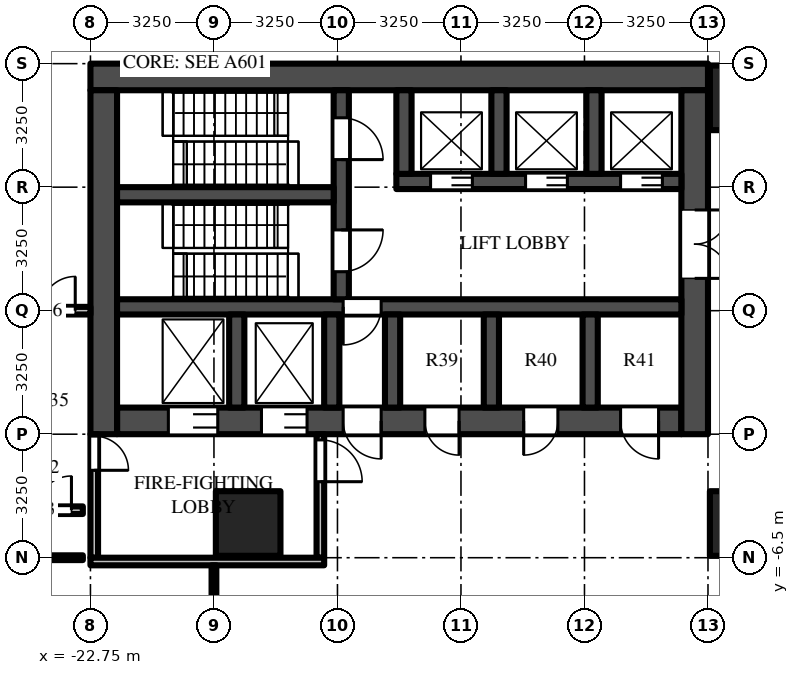
"""IFC4 building model, lengths in metres.
Left out: names, types, materials, properties, quantities, classifications, styles, units other than length and angle.
Written with IfcOpenShell. Run it as: python <this file> out.ifc"""

import sys

from ifc_helpers import new_model, si_unit, direction, frame, frame_2d, origin, origin_2d, place, context, subcontext, project, spatial, rectangle, extrude, source, transform, mapped, element, fill, save


model = new_model("IFC4")
c1 = context("Model", 3, precision=1e-05, world=origin(), true_north=direction((0.0, 1.0)))
c2 = subcontext(c1, "Body", "Model", "MODEL_VIEW")
j1 = project(units=[si_unit("LENGTHUNIT", "METRE"), si_unit("PLANEANGLEUNIT", "RADIAN")], contexts=[c1])
p1 = place(None, origin())
s1 = spatial("IfcSite", under=j1, at=p1, CompositionType="ELEMENT")
p2 = place(p1, origin())
s2 = spatial("IfcBuilding", under=s1, at=p2, CompositionType="ELEMENT")
p3 = place(p2, origin())
s3 = spatial("IfcBuildingStorey", under=s2, at=p3, CompositionType="ELEMENT", Elevation=0.0)
m1 = source(origin(), c2, "Body", "SweptSolid", [
    extrude(rectangle(XDim=1.7, YDim=1.7, at=origin_2d()), origin(), (0.0, 0.0, 1.0), 8.5),
])
for number, where, z_axis, x_axis in (
    (1, (-5.6, 5.6, -0.5), (0.0, 0.0, 1.0), (1.0, 0.0, 0.0)),
    (2, (-5.6, -5.6, -0.5), (0.0, 0.0, 1.0), (1.0, 0.0, 0.0)),
    (3, (-18.6, -5.6, -0.5), (0.0, 0.0, 1.0), (1.0, 0.0, 0.0)),
):
    element("IfcColumn", number, at=place(p3, frame(where, z_axis=z_axis, x_axis=x_axis)), inside=s3, PredefinedType="COLUMN", context=c2, shape_type="MappedRepresentation", body=[
        mapped(m1, transform((0.0, 0.0, 0.0))),
    ])
m2 = source(origin(), c2, "Body", "SweptSolid", [
    extrude(rectangle(XDim=16.25, YDim=0.7, at=frame_2d((8.125, 0.0))), origin(), (0.0, 0.0, 1.0), 7.7),
])
p4 = place(p3, frame((-6.5, 6.15, 0.0), z_axis=(0.0, 0.0, 1.0), x_axis=(-1.0, 0.0, 0.0)))
e4 = element("IfcWall", 4, at=p4, inside=s3, PredefinedType="SHEAR", context=c2, shape_type="MappedRepresentation", body=[
    mapped(m2, transform((0.0, 0.0, 0.0))),
])
m3 = source(origin(), c2, "Body", "SweptSolid", [
    extrude(rectangle(XDim=14.85, YDim=0.7, at=frame_2d((7.425, 0.0))), origin(), (0.0, 0.0, 1.0), 7.7),
])
p5 = place(p3, frame((-7.2, -2.9, 0.0), z_axis=(0.0, 0.0, 1.0), x_axis=(-1.0, 0.0, 0.0)))
e5 = element("IfcWall", 5, at=p5, inside=s3, PredefinedType="SHEAR", context=c2, shape_type="MappedRepresentation", body=[
    mapped(m3, transform((0.0, 0.0, 0.0))),
])
m4 = source(origin(), c2, "Body", "SweptSolid", [
    extrude(rectangle(XDim=1.3, YDim=2.1, at=frame_2d((0.65, 1.05))), frame((0.0, 0.36, 0.0), z_axis=(0.0, -1.0, 0.0), x_axis=(1.0, 0.0, 0.0)), (0.0, 0.0, 1.0), 0.72),
])
p6 = place(p5, frame((12.2, 0.0, 0.0)))
e6 = element("IfcOpeningElement", 6, at=p6, cuts=e5, PredefinedType="OPENING", context=c2, shape_type="MappedRepresentation", body=[
    mapped(m4, transform((0.0, 0.0, 0.0))),
])
m5 = source(origin(), c2, "Body", "SweptSolid", [
    extrude(rectangle(XDim=1.2, YDim=2.1, at=frame_2d((0.6, 1.05))), frame((0.0, 0.36, 0.0), z_axis=(0.0, -1.0, 0.0), x_axis=(1.0, 0.0, 0.0)), (0.0, 0.0, 1.0), 0.72),
])
p7 = place(p5, frame((9.85, 0.0, 0.0)))
e7 = element("IfcOpeningElement", 7, at=p7, cuts=e5, PredefinedType="OPENING", context=c2, shape_type="MappedRepresentation", body=[
    mapped(m5, transform((0.0, 0.0, 0.0))),
])
m6 = source(origin(), c2, "Body", "SweptSolid", [
    extrude(rectangle(XDim=1.0, YDim=2.1, at=frame_2d((0.5, 1.05))), frame((0.0, 0.36, 0.0), z_axis=(0.0, -1.0, 0.0), x_axis=(1.0, 0.0, 0.0)), (0.0, 0.0, 1.0), 0.72),
])
p8 = place(p5, frame((7.9, 0.0, 0.0)))
e8 = element("IfcOpeningElement", 8, at=p8, cuts=e5, PredefinedType="OPENING", context=c2, shape_type="MappedRepresentation", body=[
    mapped(m6, transform((0.0, 0.0, 0.0))),
])
p9 = place(p5, frame((0.6, 0.0, 0.0)))
e9 = element("IfcOpeningElement", 9, at=p9, cuts=e5, PredefinedType="OPENING", context=c2, shape_type="MappedRepresentation", body=[
    mapped(m6, transform((0.0, 0.0, 0.0))),
])
m7 = source(origin(), c2, "Body", "SweptSolid", [
    extrude(rectangle(XDim=0.9, YDim=2.1, at=frame_2d((0.45, 1.05))), frame((0.0, 0.36, 0.0), z_axis=(0.0, -1.0, 0.0), x_axis=(1.0, 0.0, 0.0)), (0.0, 0.0, 1.0), 0.72),
])
p10 = place(p5, frame((3.25, 0.0, 0.0)))
e10 = element("IfcOpeningElement", 10, at=p10, cuts=e5, PredefinedType="OPENING", context=c2, shape_type="MappedRepresentation", body=[
    mapped(m7, transform((0.0, 0.0, 0.0))),
])
p11 = place(p5, frame((5.85, 0.0, 0.0)))
e11 = element("IfcOpeningElement", 11, at=p11, cuts=e5, PredefinedType="OPENING", context=c2, shape_type="MappedRepresentation", body=[
    mapped(m7, transform((0.0, 0.0, 0.0))),
])
m8 = source(origin(), c2, "Body", "SweptSolid", [
    extrude(rectangle(XDim=9.05, YDim=0.7, at=frame_2d((4.525, 0.0))), origin(), (0.0, 0.0, 1.0), 7.7),
])
p12 = place(p3, frame((-6.85, 5.8, 0.0), z_axis=(0.0, 0.0, 1.0), x_axis=(0.0, -1.0, 0.0)))
e12 = element("IfcWall", 12, at=p12, inside=s3, PredefinedType="SHEAR", context=c2, shape_type="MappedRepresentation", body=[
    mapped(m8, transform((0.0, 0.0, 0.0))),
])
m9 = source(origin(), c2, "Body", "SweptSolid", [
    extrude(rectangle(XDim=1.8, YDim=2.1, at=frame_2d((0.9, 1.05))), frame((0.0, 0.36, 0.0), z_axis=(0.0, -1.0, 0.0), x_axis=(1.0, 0.0, 0.0)), (0.0, 0.0, 1.0), 0.72),
])
p13 = place(p12, frame((3.15, 0.0, 0.0)))
e13 = element("IfcOpeningElement", 13, at=p13, cuts=e12, PredefinedType="OPENING", context=c2, shape_type="MappedRepresentation", body=[
    mapped(m9, transform((0.0, 0.0, 0.0))),
])
p14 = place(p3, frame((-22.4, 5.8, 0.0), z_axis=(0.0, 0.0, 1.0), x_axis=(0.0, -1.0, 0.0)))
e14 = element("IfcWall", 14, at=p14, inside=s3, PredefinedType="SHEAR", context=c2, shape_type="MappedRepresentation", body=[
    mapped(m8, transform((0.0, 0.0, 0.0))),
])
m10 = source(origin(), c2, "Body", "SweptSolid", [
    extrude(rectangle(XDim=7.5, YDim=0.4, at=frame_2d((3.75, 0.0))), origin(), (0.0, 0.0, 1.0), 7.7),
])
p15 = place(p3, frame((-7.2, 3.4, 0.0), z_axis=(0.0, 0.0, 1.0), x_axis=(-1.0, 0.0, 0.0)))
e15 = element("IfcWall", 15, at=p15, inside=s3, PredefinedType="SHEAR", context=c2, shape_type="MappedRepresentation", body=[
    mapped(m10, transform((0.0, 0.0, 0.0))),
])
m11 = source(origin(), c2, "Body", "SweptSolid", [
    extrude(rectangle(XDim=1.1, YDim=2.1, at=frame_2d((0.55, 1.05))), frame((0.0, 0.21, 0.0), z_axis=(0.0, -1.0, 0.0), x_axis=(1.0, 0.0, 0.0)), (0.0, 0.0, 1.0), 0.42),
])
p16 = place(p15, frame((0.5, 0.0, 0.0)))
e16 = element("IfcOpeningElement", 16, at=p16, cuts=e15, PredefinedType="OPENING", context=c2, shape_type="MappedRepresentation", body=[
    mapped(m11, transform((0.0, 0.0, 0.0))),
])
p17 = place(p15, frame((3.0, 0.0, 0.0)))
e17 = element("IfcOpeningElement", 17, at=p17, cuts=e15, PredefinedType="OPENING", context=c2, shape_type="MappedRepresentation", body=[
    mapped(m11, transform((0.0, 0.0, 0.0))),
])
p18 = place(p15, frame((5.5, 0.0, 0.0)))
e18 = element("IfcOpeningElement", 18, at=p18, cuts=e15, PredefinedType="OPENING", context=c2, shape_type="MappedRepresentation", body=[
    mapped(m11, transform((0.0, 0.0, 0.0))),
])
m12 = source(origin(), c2, "Body", "SweptSolid", [
    extrude(rectangle(XDim=14.85, YDim=0.4, at=frame_2d((7.425, 0.0))), origin(), (0.0, 0.0, 1.0), 7.7),
])
p19 = place(p3, frame((-7.2, 0.1, 0.0), z_axis=(0.0, 0.0, 1.0), x_axis=(-1.0, 0.0, 0.0)))
e19 = element("IfcWall", 19, at=p19, inside=s3, PredefinedType="SHEAR", context=c2, shape_type="MappedRepresentation", body=[
    mapped(m12, transform((0.0, 0.0, 0.0))),
])
m13 = source(origin(), c2, "Body", "SweptSolid", [
    extrude(rectangle(XDim=1.0, YDim=2.1, at=frame_2d((0.5, 1.05))), frame((0.0, 0.21, 0.0), z_axis=(0.0, -1.0, 0.0), x_axis=(1.0, 0.0, 0.0)), (0.0, 0.0, 1.0), 0.42),
])
p20 = place(p19, frame((7.9, 0.0, 0.0)))
e20 = element("IfcOpeningElement", 20, at=p20, cuts=e19, PredefinedType="OPENING", context=c2, shape_type="MappedRepresentation", body=[
    mapped(m13, transform((0.0, 0.0, 0.0))),
])
m14 = source(origin(), c2, "Body", "SweptSolid", [
    extrude(rectangle(XDim=5.5, YDim=0.4, at=frame_2d((2.75, 0.0))), origin(), (0.0, 0.0, 1.0), 7.7),
])
p21 = place(p3, frame((-16.15, 5.8, 0.0), z_axis=(0.0, 0.0, 1.0), x_axis=(0.0, -1.0, 0.0)))
e21 = element("IfcWall", 21, at=p21, inside=s3, PredefinedType="SHEAR", context=c2, shape_type="MappedRepresentation", body=[
    mapped(m14, transform((0.0, 0.0, 0.0))),
])
p22 = place(p21, frame((0.725, 0.0, 0.0)))
e22 = element("IfcOpeningElement", 22, at=p22, cuts=e21, PredefinedType="OPENING", context=c2, shape_type="MappedRepresentation", body=[
    mapped(m11, transform((0.0, 0.0, 0.0))),
])
p23 = place(p21, frame((3.675, 0.0, 0.0)))
e23 = element("IfcOpeningElement", 23, at=p23, cuts=e21, PredefinedType="OPENING", context=c2, shape_type="MappedRepresentation", body=[
    mapped(m11, transform((0.0, 0.0, 0.0))),
])
m15 = source(origin(), c2, "Body", "SweptSolid", [
    extrude(rectangle(XDim=5.7, YDim=0.4, at=frame_2d((2.85, 0.0))), origin(), (0.0, 0.0, 1.0), 7.7),
])
p24 = place(p3, frame((-16.35, 3.05, 0.0), z_axis=(0.0, 0.0, 1.0), x_axis=(-1.0, 0.0, 0.0)))
e24 = element("IfcWall", 24, at=p24, inside=s3, PredefinedType="SHEAR", context=c2, shape_type="MappedRepresentation", body=[
    mapped(m15, transform((0.0, 0.0, 0.0))),
])
m16 = source(origin(), c2, "Body", "SweptSolid", [
    extrude(rectangle(XDim=2.2, YDim=0.4, at=frame_2d((1.1, 0.0))), origin(), (0.0, 0.0, 1.0), 7.7),
])
for number, where, z_axis, x_axis in (
    (25, (-9.5, 5.8, 0.0), (0.0, 0.0, 1.0), (0.0, -1.0, 0.0)),
    (26, (-12.0, 5.8, 0.0), (0.0, 0.0, 1.0), (0.0, -1.0, 0.0)),
    (27, (-14.5, 5.8, 0.0), (0.0, 0.0, 1.0), (0.0, -1.0, 0.0)),
):
    element("IfcWall", number, at=place(p3, frame(where, z_axis=z_axis, x_axis=x_axis)), inside=s3, PredefinedType="SHEAR", context=c2, shape_type="MappedRepresentation", body=[
        mapped(m16, transform((0.0, 0.0, 0.0))),
    ])
m17 = source(origin(), c2, "Body", "SweptSolid", [
    extrude(rectangle(XDim=2.45, YDim=0.4, at=frame_2d((1.225, 0.0))), origin(), (0.0, 0.0, 1.0), 7.7),
])
for number, where, z_axis, x_axis in (
    (28, (-9.6, -0.1, 0.0), (0.0, 0.0, 1.0), (0.0, -1.0, 0.0)),
    (29, (-12.2, -0.1, 0.0), (0.0, 0.0, 1.0), (0.0, -1.0, 0.0)),
    (30, (-14.8, -0.1, 0.0), (0.0, 0.0, 1.0), (0.0, -1.0, 0.0)),
    (31, (-16.4, -0.1, 0.0), (0.0, 0.0, 1.0), (0.0, -1.0, 0.0)),
    (32, (-18.9, -0.1, 0.0), (0.0, 0.0, 1.0), (0.0, -1.0, 0.0)),
):
    element("IfcWall", number, at=place(p3, frame(where, z_axis=z_axis, x_axis=x_axis)), inside=s3, PredefinedType="SHEAR", context=c2, shape_type="MappedRepresentation", body=[
        mapped(m17, transform((0.0, 0.0, 0.0))),
    ])
m18 = source(origin(), c2, "Body", "SweptSolid", [
    extrude(rectangle(XDim=3.25, YDim=0.2, at=frame_2d((1.625, 0.0))), origin(), (0.0, 0.0, 1.0), 7.7),
])
p25 = place(p3, frame((-16.7, -3.25, 0.0), z_axis=(0.0, 0.0, 1.0), x_axis=(0.0, -1.0, 0.0)))
e33 = element("IfcWall", 33, at=p25, inside=s3, PredefinedType="PARTITIONING", context=c2, shape_type="MappedRepresentation", body=[
    mapped(m18, transform((0.0, 0.0, 0.0))),
])
m19 = source(origin(), c2, "Body", "SweptSolid", [
    extrude(rectangle(XDim=1.1, YDim=2.1, at=frame_2d((0.55, 1.05))), frame((0.0, 0.11, 0.0), z_axis=(0.0, -1.0, 0.0), x_axis=(1.0, 0.0, 0.0)), (0.0, 0.0, 1.0), 0.22),
])
p26 = place(p25, frame((0.15, 0.0, 0.0)))
e34 = element("IfcOpeningElement", 34, at=p26, cuts=e33, PredefinedType="OPENING", context=c2, shape_type="MappedRepresentation", body=[
    mapped(m19, transform((0.0, 0.0, 0.0))),
])
p27 = place(p3, frame((-22.65, -3.25, 0.0), z_axis=(0.0, 0.0, 1.0), x_axis=(0.0, -1.0, 0.0)))
e35 = element("IfcWall", 35, at=p27, inside=s3, PredefinedType="PARTITIONING", context=c2, shape_type="MappedRepresentation", body=[
    mapped(m18, transform((0.0, 0.0, 0.0))),
])
m20 = source(origin(), c2, "Body", "SweptSolid", [
    extrude(rectangle(XDim=0.9, YDim=2.1, at=frame_2d((0.45, 1.05))), frame((0.0, 0.11, 0.0), z_axis=(0.0, -1.0, 0.0), x_axis=(1.0, 0.0, 0.0)), (0.0, 0.0, 1.0), 0.22),
])
p28 = place(p27, frame((0.05, 0.0, 0.0)))
e36 = element("IfcOpeningElement", 36, at=p28, cuts=e35, PredefinedType="OPENING", context=c2, shape_type="MappedRepresentation", body=[
    mapped(m20, transform((0.0, 0.0, 0.0))),
])
m21 = source(origin(), c2, "Body", "SweptSolid", [
    extrude(rectangle(XDim=6.15, YDim=0.2, at=frame_2d((3.075, 0.0))), origin(), (0.0, 0.0, 1.0), 7.7),
])
p29 = place(p3, frame((-16.6, -6.6, 0.0), z_axis=(0.0, 0.0, 1.0), x_axis=(-1.0, 0.0, 0.0)))
e37 = element("IfcWall", 37, at=p29, inside=s3, PredefinedType="PARTITIONING", context=c2, shape_type="MappedRepresentation", body=[
    mapped(m21, transform((0.0, 0.0, 0.0))),
])
p30 = place(p3, frame((-19.5, -12.9, 0.0), z_axis=(0.0, 0.0, 1.0), x_axis=(0.0, 1.0, 0.0)))
e38 = element("IfcWall", 38, at=p30, inside=s3, PredefinedType="PARTITIONING", context=c2, shape_type="SweptSolid", body=[
    extrude(rectangle(XDim=6.2, YDim=0.125, at=frame_2d((3.1, 0.0))), origin(), (0.0, 0.0, 1.0), 7.7),
])
m22 = source(origin(), c2, "Body", "SweptSolid", [
    extrude(rectangle(XDim=1.0, YDim=2.1, at=frame_2d((0.5, 1.05))), frame((0.0, 0.073, 0.0), z_axis=(0.0, -1.0, 0.0), x_axis=(1.0, 0.0, 0.0)), (0.0, 0.0, 1.0), 0.145),
])
p31 = place(p30, frame((0.25, 0.0, 0.0)))
e39 = element("IfcOpeningElement", 39, at=p31, cuts=e38, PredefinedType="OPENING", context=c2, shape_type="MappedRepresentation", body=[
    mapped(m22, transform((0.0, 0.0, 0.0))),
])
p32 = place(p3, frame((-22.95, -6.5, 0.0), z_axis=(0.0, 0.0, 1.0), x_axis=(-1.0, 0.0, 0.0)))
e40 = element("IfcWall", 40, at=p32, inside=s3, PredefinedType="PARTITIONING", context=c2, shape_type="SweptSolid", body=[
    extrude(rectangle(XDim=3.15, YDim=0.125, at=frame_2d((1.575, 0.0))), origin(), (0.0, 0.0, 1.0), 6.997),
])
m23 = source(origin(), c2, "Body", "SweptSolid", [
    extrude(rectangle(XDim=2.5, YDim=0.2, at=frame_2d((1.25, 0.0))), origin(), (0.0, 0.0, 1.0), 7.7),
])
p33 = place(p3, frame((-25.45, -5.25, 0.0), z_axis=(0.0, 0.0, 1.0), x_axis=(1.0, 0.0, 0.0)))
e41 = element("IfcWall", 41, at=p33, inside=s3, PredefinedType="PARTITIONING", context=c2, shape_type="MappedRepresentation", body=[
    mapped(m23, transform((0.0, 0.0, 0.0))),
])
m24 = source(origin(), c2, "Body", "SweptSolid", [
    extrude(rectangle(XDim=1.8, YDim=2.1, at=frame_2d((0.9, 1.05))), frame((0.0, 0.11, 0.0), z_axis=(0.0, -1.0, 0.0), x_axis=(1.0, 0.0, 0.0)), (0.0, 0.0, 1.0), 0.22),
])
p34 = place(p33, frame((0.4, 0.0, 0.0)))
e42 = element("IfcOpeningElement", 42, at=p34, cuts=e41, PredefinedType="OPENING", context=c2, shape_type="MappedRepresentation", body=[
    mapped(m24, transform((0.0, 0.0, 0.0))),
])
m25 = source(origin(), c2, "Body", "SweptSolid", [
    extrude(rectangle(XDim=3.25, YDim=0.2, at=frame_2d((1.625, 0.0))), origin(), (0.0, 0.0, 1.0), 7.077),
])
p35 = place(p3, frame((-26.0, 0.0, 0.0), z_axis=(0.0, 0.0, 1.0), x_axis=(1.0, 0.0, 0.0)))
e43 = element("IfcWall", 43, at=p35, inside=s3, PredefinedType="PARTITIONING", context=c2, shape_type="MappedRepresentation", body=[
    mapped(m25, transform((0.0, 0.0, 0.0))),
])
p36 = place(p35, frame((1.05, 0.0, 0.0)))
e44 = element("IfcOpeningElement", 44, at=p36, cuts=e43, PredefinedType="OPENING", context=c2, shape_type="MappedRepresentation", body=[
    mapped(m24, transform((0.0, 0.0, 0.0))),
])
m26 = source(origin(), c2, "Body", "SweptSolid", [
    extrude(rectangle(XDim=1.1, YDim=2.1, at=frame_2d((0.55, 1.05))), frame((0.0, 0.025, 0.0), z_axis=(0.0, -1.0, 0.0), x_axis=(1.0, 0.0, 0.0)), (0.0, 0.0, 1.0), 0.05),
])
p37 = place(p16, origin())
e45 = element("IfcDoor", 45, at=p37, inside=s3, OperationType="DOUBLE_DOOR_SLIDING", PredefinedType="DOOR", context=c2, shape_type="MappedRepresentation", body=[
    mapped(m26, transform((0.0, 0.0, 0.0))),
])
fill(e16, e45)
p38 = place(p17, origin())
e46 = element("IfcDoor", 46, at=p38, inside=s3, OperationType="DOUBLE_DOOR_SLIDING", PredefinedType="DOOR", context=c2, shape_type="MappedRepresentation", body=[
    mapped(m26, transform((0.0, 0.0, 0.0))),
])
fill(e17, e46)
p39 = place(p18, origin())
e47 = element("IfcDoor", 47, at=p39, inside=s3, OperationType="DOUBLE_DOOR_SLIDING", PredefinedType="DOOR", context=c2, shape_type="MappedRepresentation", body=[
    mapped(m26, transform((0.0, 0.0, 0.0))),
])
fill(e18, e47)
m27 = source(origin(), c2, "Body", "SweptSolid", [
    extrude(rectangle(XDim=1.3, YDim=2.1, at=frame_2d((0.65, 1.05))), frame((0.0, -0.275, 0.0), z_axis=(0.0, -1.0, 0.0), x_axis=(1.0, 0.0, 0.0)), (0.0, 0.0, 1.0), 0.05),
])
p40 = place(p6, origin())
e48 = element("IfcDoor", 48, at=p40, inside=s3, OperationType="DOUBLE_DOOR_SLIDING", PredefinedType="DOOR", context=c2, shape_type="MappedRepresentation", body=[
    mapped(m27, transform((0.0, 0.0, 0.0))),
])
fill(e6, e48)
m28 = source(origin(), c2, "Body", "SweptSolid", [
    extrude(rectangle(XDim=1.2, YDim=2.1, at=frame_2d((0.6, 1.05))), frame((0.0, -0.275, 0.0), z_axis=(0.0, -1.0, 0.0), x_axis=(1.0, 0.0, 0.0)), (0.0, 0.0, 1.0), 0.05),
])
p41 = place(p7, origin())
e49 = element("IfcDoor", 49, at=p41, inside=s3, OperationType="DOUBLE_DOOR_SLIDING", PredefinedType="DOOR", context=c2, shape_type="MappedRepresentation", body=[
    mapped(m28, transform((0.0, 0.0, 0.0))),
])
fill(e7, e49)
m29 = source(origin(), c2, "Body", "SweptSolid", [
    extrude(rectangle(XDim=1.8, YDim=2.1, at=frame_2d((0.9, 1.05))), frame((0.0, -0.275, 0.0), z_axis=(0.0, -1.0, 0.0), x_axis=(1.0, 0.0, 0.0)), (0.0, 0.0, 1.0), 0.05),
])
p42 = place(p13, origin())
e50 = element("IfcDoor", 50, at=p42, inside=s3, OperationType="DOUBLE_DOOR_SINGLE_SWING", PredefinedType="DOOR", context=c2, shape_type="MappedRepresentation", body=[
    mapped(m29, transform((0.0, 0.0, 0.0))),
])
fill(e13, e50)
p43 = place(p22, origin())
e51 = element("IfcDoor", 51, at=p43, inside=s3, OperationType="SINGLE_SWING_RIGHT", PredefinedType="DOOR", context=c2, shape_type="MappedRepresentation", body=[
    mapped(m26, transform((0.0, 0.0, 0.0))),
])
fill(e22, e51)
p44 = place(p23, origin())
e52 = element("IfcDoor", 52, at=p44, inside=s3, OperationType="SINGLE_SWING_LEFT", PredefinedType="DOOR", context=c2, shape_type="MappedRepresentation", body=[
    mapped(m26, transform((0.0, 0.0, 0.0))),
])
fill(e23, e52)
m30 = source(origin(), c2, "Body", "SweptSolid", [
    extrude(rectangle(XDim=1.0, YDim=2.1, at=frame_2d((0.5, 1.05))), frame((0.0, 0.025, 0.0), z_axis=(0.0, -1.0, 0.0), x_axis=(1.0, 0.0, 0.0)), (0.0, 0.0, 1.0), 0.05),
])
p45 = place(p20, origin())
e53 = element("IfcDoor", 53, at=p45, inside=s3, OperationType="SINGLE_SWING_RIGHT", PredefinedType="DOOR", context=c2, shape_type="MappedRepresentation", body=[
    mapped(m30, transform((0.0, 0.0, 0.0))),
])
fill(e20, e53)
m31 = source(origin(), c2, "Body", "SweptSolid", [
    extrude(rectangle(XDim=1.0, YDim=2.1, at=frame_2d((0.5, 1.05))), frame((0.0, -0.275, 0.0), z_axis=(0.0, -1.0, 0.0), x_axis=(1.0, 0.0, 0.0)), (0.0, 0.0, 1.0), 0.05),
])
p46 = place(p8, origin())
e54 = element("IfcDoor", 54, at=p46, inside=s3, OperationType="SINGLE_SWING_LEFT", PredefinedType="DOOR", context=c2, shape_type="MappedRepresentation", body=[
    mapped(m31, transform((0.0, 0.0, 0.0))),
])
fill(e8, e54)
p47 = place(p26, origin())
e55 = element("IfcDoor", 55, at=p47, inside=s3, OperationType="SINGLE_SWING_RIGHT", PredefinedType="DOOR", context=c2, shape_type="MappedRepresentation", body=[
    mapped(m26, transform((0.0, 0.0, 0.0))),
])
fill(e34, e55)
m32 = source(origin(), c2, "Body", "SweptSolid", [
    extrude(rectangle(XDim=0.9, YDim=2.1, at=frame_2d((0.45, 1.05))), frame((0.0, 0.025, 0.0), z_axis=(0.0, -1.0, 0.0), x_axis=(1.0, 0.0, 0.0)), (0.0, 0.0, 1.0), 0.05),
])
p48 = place(p28, origin())
e56 = element("IfcDoor", 56, at=p48, inside=s3, OperationType="SINGLE_SWING_RIGHT", PredefinedType="DOOR", context=c2, shape_type="MappedRepresentation", body=[
    mapped(m32, transform((0.0, 0.0, 0.0))),
])
fill(e36, e56)
p49 = place(p9, origin())
e57 = element("IfcDoor", 57, at=p49, inside=s3, OperationType="SINGLE_SWING_LEFT", PredefinedType="DOOR", context=c2, shape_type="MappedRepresentation", body=[
    mapped(m31, transform((0.0, 0.0, 0.0))),
])
fill(e9, e57)
m33 = source(origin(), c2, "Body", "SweptSolid", [
    extrude(rectangle(XDim=0.9, YDim=2.1, at=frame_2d((0.45, 1.05))), frame((0.0, -0.275, 0.0), z_axis=(0.0, -1.0, 0.0), x_axis=(1.0, 0.0, 0.0)), (0.0, 0.0, 1.0), 0.05),
])
p50 = place(p10, origin())
e58 = element("IfcDoor", 58, at=p50, inside=s3, OperationType="SINGLE_SWING_RIGHT", PredefinedType="DOOR", context=c2, shape_type="MappedRepresentation", body=[
    mapped(m33, transform((0.0, 0.0, 0.0))),
])
fill(e10, e58)
p51 = place(p11, origin())
e59 = element("IfcDoor", 59, at=p51, inside=s3, OperationType="SINGLE_SWING_LEFT", PredefinedType="DOOR", context=c2, shape_type="MappedRepresentation", body=[
    mapped(m33, transform((0.0, 0.0, 0.0))),
])
fill(e11, e59)
m34 = source(origin(), c2, "Body", "SweptSolid", [
    extrude(rectangle(XDim=1.8, YDim=2.1, at=frame_2d((0.9, 1.05))), frame((0.0, 0.025, 0.0), z_axis=(0.0, -1.0, 0.0), x_axis=(1.0, 0.0, 0.0)), (0.0, 0.0, 1.0), 0.05),
])
p52 = place(p34, origin())
e60 = element("IfcDoor", 60, at=p52, inside=s3, OperationType="DOUBLE_DOOR_SINGLE_SWING", PredefinedType="DOOR", context=c2, shape_type="MappedRepresentation", body=[
    mapped(m34, transform((0.0, 0.0, 0.0))),
])
fill(e42, e60)
p53 = place(p36, origin())
e61 = element("IfcDoor", 61, at=p53, inside=s3, OperationType="DOUBLE_DOOR_SINGLE_SWING", PredefinedType="DOOR", context=c2, shape_type="MappedRepresentation", body=[
    mapped(m34, transform((0.0, 0.0, 0.0))),
])
fill(e44, e61)
save(model, sys.argv[1])
